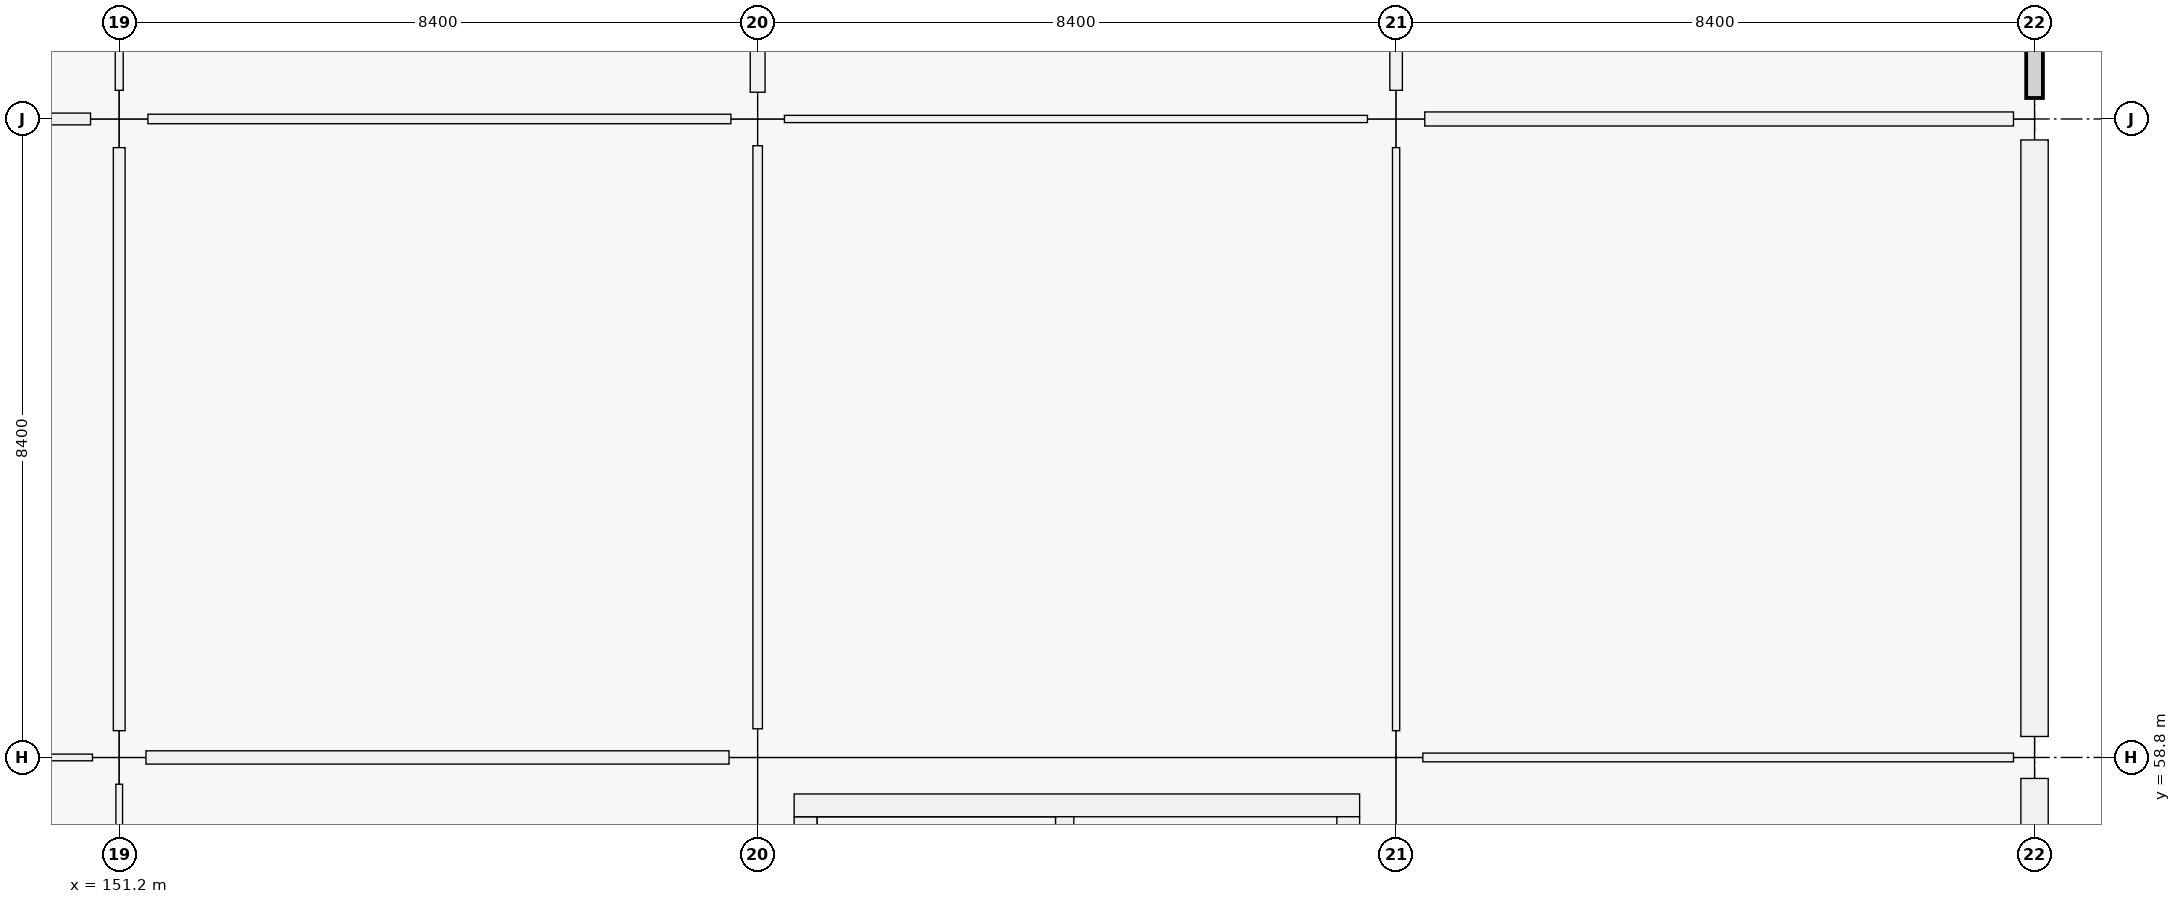
"""IFC4 building model, lengths in metres.
Left out: names, types, materials, properties, quantities, classifications, styles, units other than length and angle.
Written with IfcOpenShell. Run it as: python <this file> out.ifc"""

import sys

from ifc_helpers import new_model, si_unit, direction, frame, frame_2d, origin, origin_2d, place, context, subcontext, project, spatial, rectangle, extrude, element, fill, save


model = new_model("IFC4")
c1 = context("Model", 3, precision=1e-05, world=origin(), true_north=direction((0.0, 1.0)))
c2 = subcontext(c1, "Body", "Model", "MODEL_VIEW")
j1 = project(units=[si_unit("LENGTHUNIT", "METRE"), si_unit("PLANEANGLEUNIT", "RADIAN")], contexts=[c1])
p1 = place(None, origin())
s1 = spatial("IfcSite", under=j1, at=p1, CompositionType="ELEMENT")
p2 = place(p1, origin())
s2 = spatial("IfcBuilding", under=s1, at=p2, CompositionType="ELEMENT")
p3 = place(p2, frame((0.0, 0.0, 5.76)))
s3 = spatial("IfcBuildingStorey", under=s2, at=p3, CompositionType="ELEMENT", Elevation=5.76)
p4 = place(p3, frame((151.2, 58.8, 0.0), z_axis=(0.0, 0.0, 1.0), x_axis=(1.0, 0.0, 0.0)))
e1 = element("IfcColumn", 1, at=p4, inside=s3, PredefinedType="COLUMN", context=c2, shape_type="SweptSolid", body=[
    extrude(rectangle(XDim=0.7, YDim=0.7, at=origin_2d()), origin(), (0.0, 0.0, 1.0), 4.5),
])
for number, where, z_axis, x_axis in (
    (2, (151.2, 67.2, 0.0), (0.0, 0.0, 1.0), (1.0, 0.0, 0.0)),
    (3, (159.6, 58.8, 0.0), (0.0, 0.0, 1.0), (1.0, 0.0, 0.0)),
):
    element("IfcColumn", number, at=place(p3, frame(where, z_axis=z_axis, x_axis=x_axis)), inside=s3, PredefinedType="COLUMN", context=c2, shape_type="SweptSolid", body=[
        extrude(rectangle(XDim=0.75, YDim=0.75, at=origin_2d()), origin(), (0.0, 0.0, 1.0), 4.5),
    ])
for number, where, z_axis, x_axis in (
    (4, (159.6, 67.2, 0.0), (0.0, 0.0, 1.0), (1.0, 0.0, 0.0)),
    (5, (168.0, 58.8, 0.0), (0.0, 0.0, 1.0), (1.0, 0.0, 0.0)),
):
    element("IfcColumn", number, at=place(p3, frame(where, z_axis=z_axis, x_axis=x_axis)), inside=s3, PredefinedType="COLUMN", context=c2, shape_type="SweptSolid", body=[
        extrude(rectangle(XDim=0.7, YDim=0.7, at=origin_2d()), origin(), (0.0, 0.0, 1.0), 4.5),
    ])
p5 = place(p3, frame((168.0, 67.2, 0.0), z_axis=(0.0, 0.0, 1.0), x_axis=(1.0, 0.0, 0.0)))
e6 = element("IfcColumn", 6, at=p5, inside=s3, PredefinedType="COLUMN", context=c2, shape_type="SweptSolid", body=[
    extrude(rectangle(XDim=0.75, YDim=0.75, at=origin_2d()), origin(), (0.0, 0.0, 1.0), 4.5),
])
for number, where, z_axis, x_axis in (
    (7, (176.4, 58.8, 0.0), (0.0, 0.0, 1.0), (1.0, 0.0, 0.0)),
    (8, (176.4, 67.2, 0.0), (0.0, 0.0, 1.0), (1.0, 0.0, 0.0)),
):
    element("IfcColumn", number, at=place(p3, frame(where, z_axis=z_axis, x_axis=x_axis)), inside=s3, PredefinedType="COLUMN", context=c2, shape_type="SweptSolid", body=[
        extrude(rectangle(XDim=0.55, YDim=0.55, at=origin_2d()), origin(), (0.0, 0.0, 1.0), 4.2),
    ])
p6 = place(p3, frame((176.4, 58.524, 0.0), z_axis=(0.0, 0.0, 1.0), x_axis=(0.0, -1.0, 0.0)))
e9 = element("IfcWall", 9, at=p6, inside=s3, PredefinedType="SOLIDWALL", context=c2, shape_type="SweptSolid", body=[
    extrude(rectangle(XDim=7.848, YDim=0.36, at=frame_2d((3.924, 0.0))), origin(), (0.0, 0.0, 1.0), 3.4),
])
p7 = place(p6, frame((2.749, 0.0, 0.9)))
e10 = element("IfcOpeningElement", 10, at=p7, cuts=e9, PredefinedType="OPENING", context=c2, shape_type="SweptSolid", body=[
    extrude(rectangle(XDim=2.35, YDim=1.6, at=frame_2d((1.175, 0.8))), frame((0.0, 0.18, 0.0), z_axis=(0.0, -1.0, 0.0), x_axis=(1.0, 0.0, 0.0)), (0.0, 0.0, 1.0), 0.36),
])
p8 = place(p3, frame((176.4, 66.924, 0.0), z_axis=(0.0, 0.0, 1.0), x_axis=(0.0, -1.0, 0.0)))
e11 = element("IfcWall", 11, at=p8, inside=s3, PredefinedType="SOLIDWALL", context=c2, shape_type="SweptSolid", body=[
    extrude(rectangle(XDim=7.848, YDim=0.36, at=frame_2d((3.924, 0.0))), origin(), (0.0, 0.0, 1.0), 3.4),
])
p9 = place(p8, frame((2.549, 0.0, 0.9)))
e12 = element("IfcOpeningElement", 12, at=p9, cuts=e11, PredefinedType="OPENING", context=c2, shape_type="SweptSolid", body=[
    extrude(rectangle(XDim=2.75, YDim=1.6, at=frame_2d((1.375, 0.8))), frame((0.0, 0.18, 0.0), z_axis=(0.0, -1.0, 0.0), x_axis=(1.0, 0.0, 0.0)), (0.0, 0.0, 1.0), 0.36),
])
p10 = place(p3, frame((160.23, 51.18, 0.0), z_axis=(0.0, 0.0, 1.0), x_axis=(0.0, 1.0, 0.0)))
e13 = element("IfcWall", 13, at=p10, inside=s3, PredefinedType="SHEAR", context=c2, shape_type="SweptSolid", body=[
    extrude(rectangle(XDim=6.84, YDim=0.3, at=frame_2d((3.42, 0.0))), origin(), (0.0, 0.0, 1.0), 4.5),
])
p11 = place(p3, frame((160.08, 58.17, 0.0), z_axis=(0.0, 0.0, 1.0), x_axis=(1.0, 0.0, 0.0)))
e14 = element("IfcWall", 14, at=p11, inside=s3, PredefinedType="SHEAR", context=c2, shape_type="SweptSolid", body=[
    extrude(rectangle(XDim=7.44, YDim=0.3, at=frame_2d((3.72, 0.0))), origin(), (0.0, 0.0, 1.0), 4.5),
])
p12 = place(p3, frame((167.37, 58.02, 0.0), z_axis=(0.0, 0.0, 1.0), x_axis=(0.0, -1.0, 0.0)))
e15 = element("IfcWall", 15, at=p12, inside=s3, PredefinedType="SHEAR", context=c2, shape_type="SweptSolid", body=[
    extrude(rectangle(XDim=6.84, YDim=0.3, at=frame_2d((3.42, 0.0))), origin(), (0.0, 0.0, 1.0), 4.5),
])
p13 = place(p3, frame((163.64, 51.18, 0.0), z_axis=(0.0, 0.0, 1.0), x_axis=(0.0, 1.0, 0.0)))
e16 = element("IfcWall", 16, at=p13, inside=s3, PredefinedType="SHEAR", context=c2, shape_type="SweptSolid", body=[
    extrude(rectangle(XDim=6.84, YDim=0.24, at=frame_2d((3.42, 0.0))), origin(), (0.0, 0.0, 1.0), 4.5),
])
p14 = place(p13, frame((0.12, 0.0, 0.0)))
e17 = element("IfcOpeningElement", 17, at=p14, cuts=e16, PredefinedType="OPENING", context=c2, shape_type="SweptSolid", body=[
    extrude(rectangle(XDim=1.0, YDim=2.15, at=frame_2d((0.5, 1.075))), frame((0.0, 0.12, 0.0), z_axis=(0.0, -1.0, 0.0), x_axis=(1.0, 0.0, 0.0)), (0.0, 0.0, 1.0), 0.24),
])
p15 = place(p3, frame((143.177, 58.8, 0.0), z_axis=(0.0, 0.0, 1.0), x_axis=(1.0, 0.0, 0.0)))
e18 = element("IfcWall", 18, at=p15, inside=s3, PredefinedType="PARTITIONING", context=c2, shape_type="SweptSolid", body=[
    extrude(rectangle(XDim=7.671, YDim=0.088, at=frame_2d((3.835, 0.0))), origin(), (0.0, 0.0, 1.0), 2.4),
])
p16 = place(p3, frame((143.152, 67.2, 0.0), z_axis=(0.0, 0.0, 1.0), x_axis=(1.0, 0.0, 0.0)))
e19 = element("IfcWall", 19, at=p16, inside=s3, PredefinedType="PARTITIONING", context=c2, shape_type="SweptSolid", body=[
    extrude(rectangle(XDim=7.671, YDim=0.155, at=frame_2d((3.835, 0.0))), origin(), (0.0, 0.0, 1.0), 2.4),
])
p17 = place(p16, frame((3.336, 0.0, 0.0)))
e20 = element("IfcOpeningElement", 20, at=p17, cuts=e19, PredefinedType="OPENING", context=c2, shape_type="SweptSolid", body=[
    extrude(rectangle(XDim=1.0, YDim=2.2, at=frame_2d((0.5, 1.1))), frame((0.0, 0.078, 0.0), z_axis=(0.0, -1.0, 0.0), x_axis=(1.0, 0.0, 0.0)), (0.0, 0.0, 1.0), 0.155),
])
p18 = place(p3, frame((151.552, 58.8, 0.0), z_axis=(0.0, 0.0, 1.0), x_axis=(1.0, 0.0, 0.0)))
e21 = element("IfcWall", 21, at=p18, inside=s3, PredefinedType="PARTITIONING", context=c2, shape_type="SweptSolid", body=[
    extrude(rectangle(XDim=7.671, YDim=0.175, at=frame_2d((3.835, 0.0))), origin(), (0.0, 0.0, 1.0), 2.4),
])
p19 = place(p18, frame((3.376, 0.0, 0.0)))
e22 = element("IfcOpeningElement", 22, at=p19, cuts=e21, PredefinedType="OPENING", context=c2, shape_type="SweptSolid", body=[
    extrude(rectangle(XDim=0.92, YDim=2.15, at=frame_2d((0.46, 1.075))), frame((0.0, 0.087, 0.0), z_axis=(0.0, -1.0, 0.0), x_axis=(1.0, 0.0, 0.0)), (0.0, 0.0, 1.0), 0.175),
])
p20 = place(p3, frame((151.577, 67.2, 0.0), z_axis=(0.0, 0.0, 1.0), x_axis=(1.0, 0.0, 0.0)))
e23 = element("IfcWall", 23, at=p20, inside=s3, PredefinedType="PARTITIONING", context=c2, shape_type="SweptSolid", body=[
    extrude(rectangle(XDim=7.671, YDim=0.125, at=frame_2d((3.835, 0.0))), origin(), (0.0, 0.0, 1.0), 2.4),
])
p21 = place(p20, frame((3.311, 0.0, 0.0)))
e24 = element("IfcOpeningElement", 24, at=p21, cuts=e23, PredefinedType="OPENING", context=c2, shape_type="SweptSolid", body=[
    extrude(rectangle(XDim=1.05, YDim=2.12, at=frame_2d((0.525, 1.06))), frame((0.0, 0.062, 0.0), z_axis=(0.0, -1.0, 0.0), x_axis=(1.0, 0.0, 0.0)), (0.0, 0.0, 1.0), 0.125),
])
p22 = place(p3, frame((159.952, 67.2, 0.0), z_axis=(0.0, 0.0, 1.0), x_axis=(1.0, 0.0, 0.0)))
e25 = element("IfcWall", 25, at=p22, inside=s3, PredefinedType="PARTITIONING", context=c2, shape_type="SweptSolid", body=[
    extrude(rectangle(XDim=7.671, YDim=0.095, at=frame_2d((3.835, 0.0))), origin(), (0.0, 0.0, 1.0), 2.4),
])
p23 = place(p22, frame((3.351, 0.0, 0.0)))
e26 = element("IfcOpeningElement", 26, at=p23, cuts=e25, PredefinedType="OPENING", context=c2, shape_type="SweptSolid", body=[
    extrude(rectangle(XDim=0.97, YDim=2.12, at=frame_2d((0.485, 1.06))), frame((0.0, 0.047, 0.0), z_axis=(0.0, -1.0, 0.0), x_axis=(1.0, 0.0, 0.0)), (0.0, 0.0, 1.0), 0.095),
])
p24 = place(p3, frame((168.352, 58.8, 0.0), z_axis=(0.0, 0.0, 1.0), x_axis=(1.0, 0.0, 0.0)))
e27 = element("IfcWall", 27, at=p24, inside=s3, PredefinedType="PARTITIONING", context=c2, shape_type="SweptSolid", body=[
    extrude(rectangle(XDim=7.771, YDim=0.115, at=frame_2d((3.885, 0.0))), origin(), (0.0, 0.0, 1.0), 2.4),
])
p25 = place(p24, frame((3.385, 0.0, 0.0)))
e28 = element("IfcOpeningElement", 28, at=p25, cuts=e27, PredefinedType="OPENING", context=c2, shape_type="SweptSolid", body=[
    extrude(rectangle(XDim=1.0, YDim=2.2, at=frame_2d((0.5, 1.1))), frame((0.0, 0.058, 0.0), z_axis=(0.0, -1.0, 0.0), x_axis=(1.0, 0.0, 0.0)), (0.0, 0.0, 1.0), 0.115),
])
p26 = place(p3, frame((168.377, 67.2, 0.0), z_axis=(0.0, 0.0, 1.0), x_axis=(1.0, 0.0, 0.0)))
e29 = element("IfcWall", 29, at=p26, inside=s3, PredefinedType="PARTITIONING", context=c2, shape_type="SweptSolid", body=[
    extrude(rectangle(XDim=7.746, YDim=0.185, at=frame_2d((3.873, 0.0))), origin(), (0.0, 0.0, 1.0), 2.4),
])
p27 = place(p26, frame((3.383, 0.0, 0.0)))
e30 = element("IfcOpeningElement", 30, at=p27, cuts=e29, PredefinedType="OPENING", context=c2, shape_type="SweptSolid", body=[
    extrude(rectangle(XDim=0.98, YDim=2.18, at=frame_2d((0.49, 1.09))), frame((0.0, 0.093, 0.0), z_axis=(0.0, -1.0, 0.0), x_axis=(1.0, 0.0, 0.0)), (0.0, 0.0, 1.0), 0.185),
])
p28 = place(p3, frame((151.2, 50.777, 0.0), z_axis=(0.0, 0.0, 1.0), x_axis=(0.0, 1.0, 0.0)))
e31 = element("IfcWall", 31, at=p28, inside=s3, PredefinedType="PARTITIONING", context=c2, shape_type="SweptSolid", body=[
    extrude(rectangle(XDim=7.671, YDim=0.088, at=frame_2d((3.835, 0.0))), origin(), (0.0, 0.0, 1.0), 2.4),
])
p29 = place(p3, frame((151.2, 59.152, 0.0), z_axis=(0.0, 0.0, 1.0), x_axis=(0.0, 1.0, 0.0)))
e32 = element("IfcWall", 32, at=p29, inside=s3, PredefinedType="PARTITIONING", context=c2, shape_type="SweptSolid", body=[
    extrude(rectangle(XDim=7.671, YDim=0.155, at=frame_2d((3.835, 0.0))), origin(), (0.0, 0.0, 1.0), 2.4),
])
p30 = place(p29, frame((3.331, 0.0, 0.0)))
e33 = element("IfcOpeningElement", 33, at=p30, cuts=e32, PredefinedType="OPENING", context=c2, shape_type="SweptSolid", body=[
    extrude(rectangle(XDim=1.01, YDim=2.12, at=frame_2d((0.505, 1.06))), frame((0.0, 0.078, 0.0), z_axis=(0.0, -1.0, 0.0), x_axis=(1.0, 0.0, 0.0)), (0.0, 0.0, 1.0), 0.155),
])
p31 = place(p3, frame((151.2, 67.577, 0.0), z_axis=(0.0, 0.0, 1.0), x_axis=(0.0, 1.0, 0.0)))
e34 = element("IfcWall", 34, at=p31, inside=s3, PredefinedType="PARTITIONING", context=c2, shape_type="SweptSolid", body=[
    extrude(rectangle(XDim=7.746, YDim=0.105, at=frame_2d((3.873, 0.0))), origin(), (0.0, 0.0, 1.0), 2.4),
])
p32 = place(p31, frame((3.388, 0.0, 0.0)))
e35 = element("IfcOpeningElement", 35, at=p32, cuts=e34, PredefinedType="OPENING", context=c2, shape_type="SweptSolid", body=[
    extrude(rectangle(XDim=0.97, YDim=2.12, at=frame_2d((0.485, 1.06))), frame((0.0, 0.052, 0.0), z_axis=(0.0, -1.0, 0.0), x_axis=(1.0, 0.0, 0.0)), (0.0, 0.0, 1.0), 0.105),
])
p33 = place(p3, frame((159.6, 59.177, 0.0), z_axis=(0.0, 0.0, 1.0), x_axis=(0.0, 1.0, 0.0)))
e36 = element("IfcWall", 36, at=p33, inside=s3, PredefinedType="PARTITIONING", context=c2, shape_type="SweptSolid", body=[
    extrude(rectangle(XDim=7.671, YDim=0.125, at=frame_2d((3.835, 0.0))), origin(), (0.0, 0.0, 1.0), 2.4),
])
p34 = place(p33, frame((3.331, 0.0, 0.0)))
e37 = element("IfcOpeningElement", 37, at=p34, cuts=e36, PredefinedType="OPENING", context=c2, shape_type="SweptSolid", body=[
    extrude(rectangle(XDim=1.01, YDim=2.12, at=frame_2d((0.505, 1.06))), frame((0.0, 0.062, 0.0), z_axis=(0.0, -1.0, 0.0), x_axis=(1.0, 0.0, 0.0)), (0.0, 0.0, 1.0), 0.125),
])
p35 = place(p3, frame((159.6, 67.552, 0.0), z_axis=(0.0, 0.0, 1.0), x_axis=(0.0, 1.0, 0.0)))
e38 = element("IfcWall", 38, at=p35, inside=s3, PredefinedType="PARTITIONING", context=c2, shape_type="SweptSolid", body=[
    extrude(rectangle(XDim=7.771, YDim=0.195, at=frame_2d((3.885, 0.0))), origin(), (0.0, 0.0, 1.0), 2.4),
])
p36 = place(p35, frame((3.365, 0.0, 0.0)))
e39 = element("IfcOpeningElement", 39, at=p36, cuts=e38, PredefinedType="OPENING", context=c2, shape_type="SweptSolid", body=[
    extrude(rectangle(XDim=1.04, YDim=2.2, at=frame_2d((0.52, 1.1))), frame((0.0, 0.098, 0.0), z_axis=(0.0, -1.0, 0.0), x_axis=(1.0, 0.0, 0.0)), (0.0, 0.0, 1.0), 0.195),
])
p37 = place(p3, frame((168.0, 59.152, 0.0), z_axis=(0.0, 0.0, 1.0), x_axis=(0.0, 1.0, 0.0)))
e40 = element("IfcWall", 40, at=p37, inside=s3, PredefinedType="PARTITIONING", context=c2, shape_type="SweptSolid", body=[
    extrude(rectangle(XDim=7.671, YDim=0.095, at=frame_2d((3.835, 0.0))), origin(), (0.0, 0.0, 1.0), 2.4),
])
p38 = place(p37, frame((3.365, 0.0, 0.0)))
e41 = element("IfcOpeningElement", 41, at=p38, cuts=e40, PredefinedType="OPENING", context=c2, shape_type="SweptSolid", body=[
    extrude(rectangle(XDim=0.94, YDim=2.15, at=frame_2d((0.47, 1.075))), frame((0.0, 0.047, 0.0), z_axis=(0.0, -1.0, 0.0), x_axis=(1.0, 0.0, 0.0)), (0.0, 0.0, 1.0), 0.095),
])
p39 = place(p3, frame((168.0, 67.577, 0.0), z_axis=(0.0, 0.0, 1.0), x_axis=(0.0, 1.0, 0.0)))
e42 = element("IfcWall", 42, at=p39, inside=s3, PredefinedType="PARTITIONING", context=c2, shape_type="SweptSolid", body=[
    extrude(rectangle(XDim=7.746, YDim=0.165, at=frame_2d((3.873, 0.0))), origin(), (0.0, 0.0, 1.0), 2.4),
])
p40 = place(p39, frame((3.413, 0.0, 0.0)))
e43 = element("IfcOpeningElement", 43, at=p40, cuts=e42, PredefinedType="OPENING", context=c2, shape_type="SweptSolid", body=[
    extrude(rectangle(XDim=0.92, YDim=2.15, at=frame_2d((0.46, 1.075))), frame((0.0, 0.083, 0.0), z_axis=(0.0, -1.0, 0.0), x_axis=(1.0, 0.0, 0.0)), (0.0, 0.0, 1.0), 0.165),
])
p41 = place(p9, origin())
e44 = element("IfcWindow", 44, at=p41, inside=s3, PartitioningType="SINGLE_PANEL", PredefinedType="WINDOW", context=c2, shape_type="SweptSolid", body=[
    extrude(rectangle(XDim=2.75, YDim=1.6, at=frame_2d((1.375, 0.8))), frame((0.0, 0.03, 0.0), z_axis=(0.0, -1.0, 0.0), x_axis=(1.0, 0.0, 0.0)), (0.0, 0.0, 1.0), 0.06),
])
fill(e12, e44)
p42 = place(p19, origin())
e45 = element("IfcDoor", 45, at=p42, inside=s3, OperationType="SINGLE_SWING_RIGHT", PredefinedType="DOOR", context=c2, shape_type="SweptSolid", body=[
    extrude(rectangle(XDim=0.92, YDim=2.15, at=frame_2d((0.46, 1.075))), frame((0.0, 0.025, 0.0), z_axis=(0.0, -1.0, 0.0), x_axis=(1.0, 0.0, 0.0)), (0.0, 0.0, 1.0), 0.05),
])
fill(e22, e45)
p43 = place(p21, origin())
e46 = element("IfcDoor", 46, at=p43, inside=s3, OperationType="SINGLE_SWING_LEFT", PredefinedType="DOOR", context=c2, shape_type="SweptSolid", body=[
    extrude(rectangle(XDim=1.05, YDim=2.12, at=frame_2d((0.525, 1.06))), frame((0.0, 0.025, 0.0), z_axis=(0.0, -1.0, 0.0), x_axis=(1.0, 0.0, 0.0)), (0.0, 0.0, 1.0), 0.05),
])
fill(e24, e46)
p44 = place(p23, origin())
e47 = element("IfcDoor", 47, at=p44, inside=s3, OperationType="SINGLE_SWING_LEFT", PredefinedType="DOOR", context=c2, shape_type="SweptSolid", body=[
    extrude(rectangle(XDim=0.97, YDim=2.12, at=frame_2d((0.485, 1.06))), frame((0.0, 0.025, 0.0), z_axis=(0.0, -1.0, 0.0), x_axis=(1.0, 0.0, 0.0)), (0.0, 0.0, 1.0), 0.05),
])
fill(e26, e47)
p45 = place(p25, origin())
e48 = element("IfcDoor", 48, at=p45, inside=s3, OperationType="SINGLE_SWING_LEFT", PredefinedType="DOOR", context=c2, shape_type="SweptSolid", body=[
    extrude(rectangle(XDim=1.0, YDim=2.2, at=frame_2d((0.5, 1.1))), frame((0.0, 0.025, 0.0), z_axis=(0.0, -1.0, 0.0), x_axis=(1.0, 0.0, 0.0)), (0.0, 0.0, 1.0), 0.05),
])
fill(e28, e48)
p46 = place(p27, origin())
e49 = element("IfcDoor", 49, at=p46, inside=s3, OperationType="SINGLE_SWING_RIGHT", PredefinedType="DOOR", context=c2, shape_type="SweptSolid", body=[
    extrude(rectangle(XDim=0.98, YDim=2.18, at=frame_2d((0.49, 1.09))), frame((0.0, 0.025, 0.0), z_axis=(0.0, -1.0, 0.0), x_axis=(1.0, 0.0, 0.0)), (0.0, 0.0, 1.0), 0.05),
])
fill(e30, e49)
p47 = place(p34, origin())
e50 = element("IfcDoor", 50, at=p47, inside=s3, OperationType="SINGLE_SWING_RIGHT", PredefinedType="DOOR", context=c2, shape_type="SweptSolid", body=[
    extrude(rectangle(XDim=1.01, YDim=2.12, at=frame_2d((0.505, 1.06))), frame((0.0, 0.025, 0.0), z_axis=(0.0, -1.0, 0.0), x_axis=(1.0, 0.0, 0.0)), (0.0, 0.0, 1.0), 0.05),
])
fill(e37, e50)
p48 = place(p30, origin())
e51 = element("IfcDoor", 51, at=p48, inside=s3, OperationType="SINGLE_SWING_RIGHT", PredefinedType="DOOR", context=c2, shape_type="SweptSolid", body=[
    extrude(rectangle(XDim=1.01, YDim=2.12, at=frame_2d((0.505, 1.06))), frame((0.0, 0.025, 0.0), z_axis=(0.0, -1.0, 0.0), x_axis=(1.0, 0.0, 0.0)), (0.0, 0.0, 1.0), 0.05),
])
fill(e33, e51)
p49 = place(p38, origin())
e52 = element("IfcDoor", 52, at=p49, inside=s3, OperationType="SINGLE_SWING_RIGHT", PredefinedType="DOOR", context=c2, shape_type="SweptSolid", body=[
    extrude(rectangle(XDim=0.94, YDim=2.15, at=frame_2d((0.47, 1.075))), frame((0.0, 0.025, 0.0), z_axis=(0.0, -1.0, 0.0), x_axis=(1.0, 0.0, 0.0)), (0.0, 0.0, 1.0), 0.05),
])
fill(e41, e52)
save(model, sys.argv[1])
